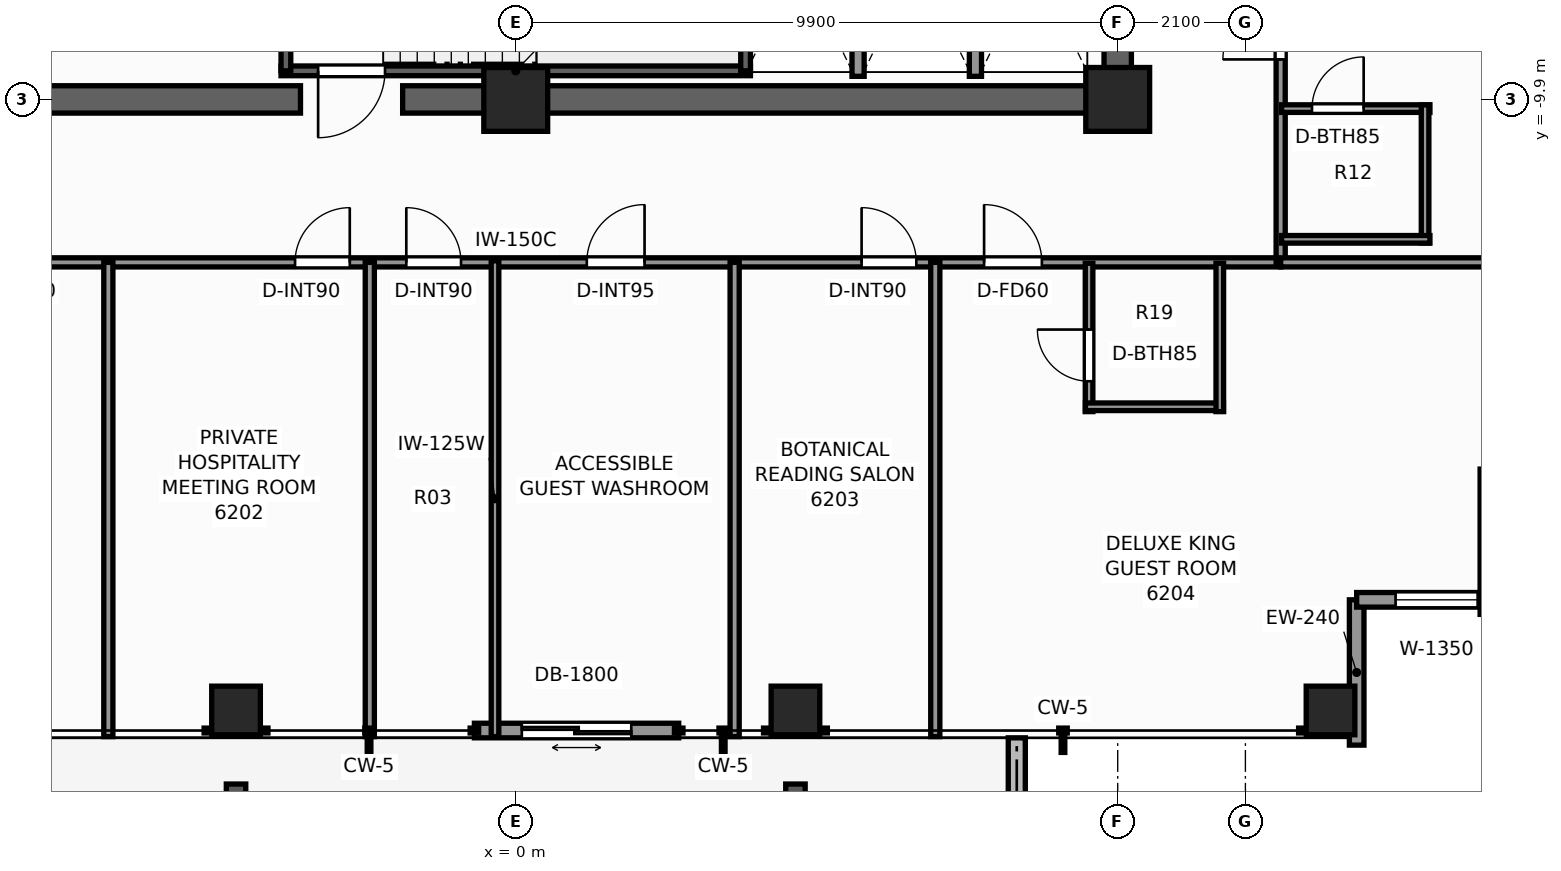
"""IFC4 building model, lengths in metres.
Left out: names, types, materials, properties, quantities, classifications, styles, units other than length and angle.
Written with IfcOpenShell. Run it as: python <this file> out.ifc"""

import sys

from ifc_helpers import new_model, si_unit, direction, frame, frame_2d, origin, origin_2d, place, context, subcontext, project, spatial, rectangle, extrude, element, fill, save


model = new_model("IFC4")
c1 = context("Model", 3, precision=1e-05, world=origin(), true_north=direction((0.0, 1.0)))
c2 = subcontext(c1, "Body", "Model", "MODEL_VIEW")
j1 = project(units=[si_unit("LENGTHUNIT", "METRE"), si_unit("PLANEANGLEUNIT", "RADIAN")], contexts=[c1])
p1 = place(None, origin())
s1 = spatial("IfcSite", under=j1, at=p1, CompositionType="ELEMENT")
p2 = place(p1, origin())
s2 = spatial("IfcBuilding", under=s1, at=p2, CompositionType="ELEMENT")
p3 = place(p2, frame((0.0, 0.0, 213.0)))
s3 = spatial("IfcBuildingStorey", under=s2, at=p3, CompositionType="ELEMENT", Elevation=213.0)
p4 = place(p3, frame((10.125, -9.9, 0.0), z_axis=(0.0, 0.0, 1.0), x_axis=(-1.0, 0.0, 0.0)))
e1 = element("IfcWall", 1, at=p4, inside=s3, PredefinedType="SHEAR", context=c2, shape_type="SweptSolid", body=[
    extrude(rectangle(XDim=11.985, YDim=0.45, at=frame_2d((5.993, 0.0))), origin(), (0.0, 0.0, 1.0), 3.3),
])
p5 = place(p3, frame((-3.54, -9.9, 0.0), z_axis=(0.0, 0.0, 1.0), x_axis=(-1.0, 0.0, 0.0)))
e2 = element("IfcWall", 2, at=p5, inside=s3, PredefinedType="SHEAR", context=c2, shape_type="SweptSolid", body=[
    extrude(rectangle(XDim=6.585, YDim=0.45, at=frame_2d((3.292, 0.0))), origin(), (0.0, 0.0, 1.0), 3.3),
])
p6 = place(p3, frame((9.9, -9.675, 0.0), z_axis=(0.0, 0.0, 1.0), x_axis=(0.0, 1.0, 0.0)))
e3 = element("IfcWall", 3, at=p6, inside=s3, PredefinedType="SHEAR", context=c2, shape_type="SweptSolid", body=[
    extrude(rectangle(XDim=4.125, YDim=0.45, at=frame_2d((2.062, 0.0))), origin(), (0.0, 0.0, 1.0), 3.3),
])
for number, where, z_axis, x_axis in (
    (4, (9.9, -9.9, 0.0), (0.0, 0.0, 1.0), (1.0, 0.0, 0.0)),
    (5, (0.0, -9.9, 0.0), (0.0, 0.0, 1.0), (1.0, 0.0, 0.0)),
):
    element("IfcColumn", number, at=place(p3, frame(where, z_axis=z_axis, x_axis=x_axis)), inside=s3, PredefinedType="COLUMN", context=c2, shape_type="SweptSolid", body=[
        extrude(rectangle(XDim=1.05, YDim=1.05, at=origin_2d()), origin(), (0.0, 0.0, 1.0), 3.3),
    ])
for number, where, z_axis, x_axis in (
    (6, (-4.6, -19.95, 0.0), (0.0, 0.0, 1.0), (1.0, 0.0, 0.0)),
    (7, (4.6, -19.95, 0.0), (0.0, 0.0, 1.0), (1.0, 0.0, 0.0)),
    (8, (13.4, -19.95, 0.0), (0.0, 0.0, 1.0), (1.0, 0.0, 0.0)),
):
    element("IfcColumn", number, at=place(p3, frame(where, z_axis=z_axis, x_axis=x_axis)), inside=s3, PredefinedType="COLUMN", context=c2, shape_type="SweptSolid", body=[
        extrude(rectangle(XDim=0.8, YDim=0.8, at=origin_2d()), origin(), (0.0, 0.0, 1.0), 3.3),
    ])
p7 = place(p3, frame((8.24, -23.074, -0.04), z_axis=(0.0, 0.0, 1.0), x_axis=(0.0, 1.0, 0.0)))
e9 = element("IfcWall", 9, at=p7, inside=s3, PredefinedType="PARAPET", context=c2, shape_type="SweptSolid", body=[
    extrude(rectangle(XDim=2.674, YDim=0.28, at=frame_2d((1.337, 0.0))), origin(), (0.0, 0.0, 1.0), 0.42),
])
p8 = place(p3, frame((2.68, -20.28, 0.0), z_axis=(0.0, 0.0, 1.0), x_axis=(-1.0, 0.0, 0.0)))
e10 = element("IfcWall", 10, at=p8, inside=s3, PredefinedType="STANDARD", context=c2, shape_type="SweptSolid", body=[
    extrude(rectangle(XDim=3.36, YDim=0.24, at=frame_2d((1.68, 0.0))), origin(), (0.0, 0.0, 1.0), 3.08),
])
p9 = place(p8, frame((0.78, 0.0, 0.0)))
e11 = element("IfcOpeningElement", 11, at=p9, cuts=e10, PredefinedType="OPENING", context=c2, shape_type="SweptSolid", body=[
    extrude(rectangle(XDim=1.8, YDim=2.2, at=frame_2d((0.9, 1.1))), frame((0.0, 0.13, 0.0), z_axis=(0.0, -1.0, 0.0), x_axis=(1.0, 0.0, 0.0)), (0.0, 0.0, 1.0), 0.26),
])
p10 = place(p3, frame((13.83, -18.13, 0.0), z_axis=(0.0, 0.0, 1.0), x_axis=(0.0, -1.0, 0.0)))
e12 = element("IfcWall", 12, at=p10, inside=s3, PredefinedType="STANDARD", context=c2, shape_type="SweptSolid", body=[
    extrude(rectangle(XDim=2.39, YDim=0.24, at=frame_2d((1.195, 0.0))), origin(), (0.0, 0.0, 1.0), 2.463),
])
p11 = place(p3, frame((16.22, -18.13, 0.0), z_axis=(0.0, 0.0, 1.0), x_axis=(-1.0, 0.0, 0.0)))
e13 = element("IfcWall", 13, at=p11, inside=s3, PredefinedType="STANDARD", context=c2, shape_type="SweptSolid", body=[
    extrude(rectangle(XDim=2.39, YDim=0.24, at=frame_2d((1.195, 0.0))), origin(), (0.0, 0.0, 1.0), 2.463),
])
p12 = place(p11, frame((0.4, 0.0, 0.65)))
e14 = element("IfcOpeningElement", 14, at=p12, cuts=e13, PredefinedType="OPENING", context=c2, shape_type="SweptSolid", body=[
    extrude(rectangle(XDim=1.35, YDim=1.55, at=frame_2d((0.675, 0.775))), frame((0.0, 0.13, 0.0), z_axis=(0.0, -1.0, 0.0), x_axis=(1.0, 0.0, 0.0)), (0.0, 0.0, 1.0), 0.26),
])
p13 = place(p3, frame((15.98, -15.98, 0.0), z_axis=(0.0, 0.0, 1.0), x_axis=(0.0, -1.0, 0.0)))
e15 = element("IfcWall", 15, at=p13, inside=s3, PredefinedType="STANDARD", context=c2, shape_type="SweptSolid", body=[
    extrude(rectangle(XDim=2.39, YDim=0.24, at=frame_2d((1.195, 0.0))), origin(), (0.0, 0.0, 1.0), 2.463),
])
p14 = place(p13, frame((0.525, 0.0, 0.65)))
e16 = element("IfcOpeningElement", 16, at=p14, cuts=e15, PredefinedType="OPENING", context=c2, shape_type="SweptSolid", body=[
    extrude(rectangle(XDim=1.1, YDim=1.45, at=frame_2d((0.55, 0.725))), frame((0.0, 0.13, 0.0), z_axis=(0.0, -1.0, 0.0), x_axis=(1.0, 0.0, 0.0)), (0.0, 0.0, 1.0), 0.26),
])
p15 = place(p3, frame((3.86, -9.43, 0.0), z_axis=(0.0, 0.0, 1.0), x_axis=(-1.0, 0.0, 0.0)))
e17 = element("IfcWall", 17, at=p15, inside=s3, PredefinedType="SHEAR", context=c2, shape_type="SweptSolid", body=[
    extrude(rectangle(XDim=7.72, YDim=0.16, at=frame_2d((3.86, 0.0))), origin(), (0.0, 0.0, 1.0), 3.3),
])
p16 = place(p15, frame((6.01, 0.0, 0.0)))
e18 = element("IfcOpeningElement", 18, at=p16, cuts=e17, PredefinedType="OPENING", context=c2, shape_type="SweptSolid", body=[
    extrude(rectangle(XDim=1.1, YDim=2.2, at=frame_2d((0.55, 1.1))), frame((0.0, 0.09, 0.0), z_axis=(0.0, -1.0, 0.0), x_axis=(1.0, 0.0, 0.0)), (0.0, 0.0, 1.0), 0.18),
])
for number, where, z_axis, x_axis in (
    (19, (-3.78, -9.43, 0.0), (0.0, 0.0, 1.0), (0.0, 1.0, 0.0)),
    (20, (3.78, -9.43, 0.0), (0.0, 0.0, 1.0), (0.0, 1.0, 0.0)),
):
    element("IfcWall", number, at=place(p3, frame(where, z_axis=z_axis, x_axis=x_axis)), inside=s3, PredefinedType="SHEAR", context=c2, shape_type="SweptSolid", body=[
        extrude(rectangle(XDim=3.35, YDim=0.16, at=frame_2d((1.675, 0.0))), origin(), (0.0, 0.0, 1.0), 3.3),
    ])
for number, where, z_axis, x_axis in (
    (21, (5.63, -9.52, 0.0), (0.0, 0.0, 1.0), (0.0, 1.0, 0.0)),
    (22, (7.56, -9.52, 0.0), (0.0, 0.0, 1.0), (0.0, 1.0, 0.0)),
):
    element("IfcWall", number, at=place(p3, frame(where, z_axis=z_axis, x_axis=x_axis)), inside=s3, PredefinedType="SOLIDWALL", context=c2, shape_type="SweptSolid", body=[
        extrude(rectangle(XDim=3.77, YDim=0.2, at=frame_2d((1.885, 0.0))), origin(), (0.0, 0.0, 1.0), 3.08),
    ])
p17 = place(p3, frame((-12.58, -12.58, 0.0), z_axis=(0.0, 0.0, 1.0), x_axis=(1.0, 0.0, 0.0)))
e23 = element("IfcWall", 23, at=p17, inside=s3, PredefinedType="PARTITIONING", context=c2, shape_type="SweptSolid", body=[
    extrude(rectangle(XDim=25.16, YDim=0.15, at=frame_2d((12.58, 0.0))), origin(), (0.0, 0.0, 1.0), 2.369),
])
p18 = place(p17, frame((3.919, 0.0, 0.0)))
e24 = element("IfcOpeningElement", 24, at=p18, cuts=e23, PredefinedType="OPENING", context=c2, shape_type="SweptSolid", body=[
    extrude(rectangle(XDim=0.9, YDim=2.06, at=frame_2d((0.45, 1.03))), frame((0.0, 0.085, 0.0), z_axis=(0.0, -1.0, 0.0), x_axis=(1.0, 0.0, 0.0)), (0.0, 0.0, 1.0), 0.17),
])
p19 = place(p17, frame((8.951, 0.0, 0.0)))
e25 = element("IfcOpeningElement", 25, at=p19, cuts=e23, PredefinedType="OPENING", context=c2, shape_type="SweptSolid", body=[
    extrude(rectangle(XDim=0.9, YDim=2.06, at=frame_2d((0.45, 1.03))), frame((0.0, 0.085, 0.0), z_axis=(0.0, -1.0, 0.0), x_axis=(1.0, 0.0, 0.0)), (0.0, 0.0, 1.0), 0.17),
])
p20 = place(p17, frame((10.78, 0.0, 0.0)))
e26 = element("IfcOpeningElement", 26, at=p20, cuts=e23, PredefinedType="OPENING", context=c2, shape_type="SweptSolid", body=[
    extrude(rectangle(XDim=0.9, YDim=2.06, at=frame_2d((0.45, 1.03))), frame((0.0, 0.085, 0.0), z_axis=(0.0, -1.0, 0.0), x_axis=(1.0, 0.0, 0.0)), (0.0, 0.0, 1.0), 0.17),
])
p21 = place(p17, frame((13.749, 0.0, 0.0)))
e27 = element("IfcOpeningElement", 27, at=p21, cuts=e23, PredefinedType="OPENING", context=c2, shape_type="SweptSolid", body=[
    extrude(rectangle(XDim=0.95, YDim=2.06, at=frame_2d((0.475, 1.03))), frame((0.0, 0.085, 0.0), z_axis=(0.0, -1.0, 0.0), x_axis=(1.0, 0.0, 0.0)), (0.0, 0.0, 1.0), 0.17),
])
p22 = place(p17, frame((18.268, 0.0, 0.0)))
e28 = element("IfcOpeningElement", 28, at=p22, cuts=e23, PredefinedType="OPENING", context=c2, shape_type="SweptSolid", body=[
    extrude(rectangle(XDim=0.9, YDim=2.06, at=frame_2d((0.45, 1.03))), frame((0.0, 0.085, 0.0), z_axis=(0.0, -1.0, 0.0), x_axis=(1.0, 0.0, 0.0)), (0.0, 0.0, 1.0), 0.17),
])
p23 = place(p17, frame((20.283, 0.0, 0.0)))
e29 = element("IfcOpeningElement", 29, at=p23, cuts=e23, PredefinedType="OPENING", context=c2, shape_type="SweptSolid", body=[
    extrude(rectangle(XDim=0.95, YDim=2.06, at=frame_2d((0.475, 1.03))), frame((0.0, 0.085, 0.0), z_axis=(0.0, -1.0, 0.0), x_axis=(1.0, 0.0, 0.0)), (0.0, 0.0, 1.0), 0.17),
])
p24 = place(p3, frame((12.58, -12.58, 0.0), z_axis=(0.0, 0.0, 1.0), x_axis=(0.0, 1.0, 0.0)))
e30 = element("IfcWall", 30, at=p24, inside=s3, PredefinedType="PARTITIONING", context=c2, shape_type="SweptSolid", body=[
    extrude(rectangle(XDim=24.84, YDim=0.15, at=frame_2d((12.42, 0.0))), origin(), (0.0, 0.0, 1.0), 2.369),
])
p25 = place(p24, frame((3.338, 0.0, 0.0)))
e31 = element("IfcOpeningElement", 31, at=p25, cuts=e30, PredefinedType="OPENING", context=c2, shape_type="SweptSolid", body=[
    extrude(rectangle(XDim=0.95, YDim=2.06, at=frame_2d((0.475, 1.03))), frame((0.0, 0.085, 0.0), z_axis=(0.0, -1.0, 0.0), x_axis=(1.0, 0.0, 0.0)), (0.0, 0.0, 1.0), 0.17),
])
p26 = place(p24, frame((9.119, 0.0, 0.0)))
e32 = element("IfcOpeningElement", 32, at=p26, cuts=e30, PredefinedType="OPENING", context=c2, shape_type="SweptSolid", body=[
    extrude(rectangle(XDim=0.95, YDim=2.06, at=frame_2d((0.475, 1.03))), frame((0.0, 0.085, 0.0), z_axis=(0.0, -1.0, 0.0), x_axis=(1.0, 0.0, 0.0)), (0.0, 0.0, 1.0), 0.17),
])
p27 = place(p24, frame((14.452, 0.0, 0.0)))
e33 = element("IfcOpeningElement", 33, at=p27, cuts=e30, PredefinedType="OPENING", context=c2, shape_type="SweptSolid", body=[
    extrude(rectangle(XDim=0.95, YDim=2.06, at=frame_2d((0.475, 1.03))), frame((0.0, 0.085, 0.0), z_axis=(0.0, -1.0, 0.0), x_axis=(1.0, 0.0, 0.0)), (0.0, 0.0, 1.0), 0.17),
])
p28 = place(p24, frame((20.887, 0.0, 0.0)))
e34 = element("IfcOpeningElement", 34, at=p28, cuts=e30, PredefinedType="OPENING", context=c2, shape_type="SweptSolid", body=[
    extrude(rectangle(XDim=0.95, YDim=2.06, at=frame_2d((0.475, 1.03))), frame((0.0, 0.085, 0.0), z_axis=(0.0, -1.0, 0.0), x_axis=(1.0, 0.0, 0.0)), (0.0, 0.0, 1.0), 0.17),
])
p29 = place(p3, frame((12.58, -12.58, 0.0), z_axis=(0.0, 0.0, 1.0), x_axis=(1.0, 0.0, 0.0)))
e35 = element("IfcWall", 35, at=p29, inside=s3, PredefinedType="PARTITIONING", context=c2, shape_type="SweptSolid", body=[
    extrude(rectangle(XDim=7.8, YDim=0.15, at=frame_2d((3.9, 0.0))), origin(), (0.0, 0.0, 1.0), 2.369),
])
for number, where, z_axis, x_axis in (
    (36, (-6.7, -20.38, 0.0), (0.0, 0.0, 1.0), (0.0, 1.0, 0.0)),
    (37, (-2.4, -20.38, 0.0), (0.0, 0.0, 1.0), (0.0, 1.0, 0.0)),
    (38, (3.6, -20.38, 0.0), (0.0, 0.0, 1.0), (0.0, 1.0, 0.0)),
):
    element("IfcWall", number, at=place(p3, frame(where, z_axis=z_axis, x_axis=x_axis)), inside=s3, PredefinedType="PARTITIONING", context=c2, shape_type="SweptSolid", body=[
        extrude(rectangle(XDim=7.8, YDim=0.15, at=frame_2d((3.9, 0.0))), origin(), (0.0, 0.0, 1.0), 2.453),
    ])
p30 = place(p3, frame((-0.341, -20.38, 0.0), z_axis=(0.0, 0.0, 1.0), x_axis=(0.0, 1.0, 0.0)))
e39 = element("IfcWall", 39, at=p30, inside=s3, PredefinedType="PARTITIONING", context=c2, shape_type="SweptSolid", body=[
    extrude(rectangle(XDim=7.825, YDim=0.125, at=frame_2d((3.913, 0.0))), origin(), (0.0, 0.0, 1.0), 2.453),
])
p31 = place(p3, frame((6.9, -20.38, 0.0), z_axis=(0.0, 0.0, 1.0), x_axis=(0.0, 1.0, 0.0)))
e40 = element("IfcWall", 40, at=p31, inside=s3, PredefinedType="PARTITIONING", context=c2, shape_type="SweptSolid", body=[
    extrude(rectangle(XDim=7.8, YDim=0.15, at=frame_2d((3.9, 0.0))), origin(), (0.0, 0.0, 1.0), 2.453),
])
p32 = place(p3, frame((9.429, -15.035, 0.0), z_axis=(0.0, 0.0, 1.0), x_axis=(0.0, 1.0, 0.0)))
e41 = element("IfcWall", 41, at=p32, inside=s3, PredefinedType="PARTITIONING", context=c2, shape_type="SweptSolid", body=[
    extrude(rectangle(XDim=2.44, YDim=0.125, at=frame_2d((1.22, 0.0))), origin(), (0.0, 0.0, 1.0), 3.08),
])
p33 = place(p32, frame((0.5, 0.0, 0.0)))
e42 = element("IfcOpeningElement", 42, at=p33, cuts=e41, PredefinedType="OPENING", context=c2, shape_type="SweptSolid", body=[
    extrude(rectangle(XDim=0.85, YDim=2.03, at=frame_2d((0.425, 1.015))), frame((0.0, 0.073, 0.0), z_axis=(0.0, -1.0, 0.0), x_axis=(1.0, 0.0, 0.0)), (0.0, 0.0, 1.0), 0.145),
])
p34 = place(p3, frame((9.369, -14.955, 0.0), z_axis=(0.0, 0.0, 1.0), x_axis=(1.0, 0.0, 0.0)))
e43 = element("IfcWall", 43, at=p34, inside=s3, PredefinedType="PARTITIONING", context=c2, shape_type="SweptSolid", body=[
    extrude(rectangle(XDim=2.27, YDim=0.125, at=frame_2d((1.135, 0.0))), origin(), (0.0, 0.0, 1.0), 2.369),
])
p35 = place(p3, frame((11.579, -15.035, 0.0), z_axis=(0.0, 0.0, 1.0), x_axis=(0.0, 1.0, 0.0)))
e44 = element("IfcWall", 44, at=p35, inside=s3, PredefinedType="PARTITIONING", context=c2, shape_type="SweptSolid", body=[
    extrude(rectangle(XDim=2.44, YDim=0.125, at=frame_2d((1.22, 0.0))), origin(), (0.0, 0.0, 1.0), 2.369),
])
p36 = place(p3, frame((12.595, -10.051, 0.0), z_axis=(0.0, 0.0, 1.0), x_axis=(1.0, 0.0, 0.0)))
e45 = element("IfcWall", 45, at=p36, inside=s3, PredefinedType="PARTITIONING", context=c2, shape_type="SweptSolid", body=[
    extrude(rectangle(XDim=2.44, YDim=0.125, at=frame_2d((1.22, 0.0))), origin(), (0.0, 0.0, 1.0), 3.08),
])
p37 = place(p36, frame((0.5, 0.0, 0.0)))
e46 = element("IfcOpeningElement", 46, at=p37, cuts=e45, PredefinedType="OPENING", context=c2, shape_type="SweptSolid", body=[
    extrude(rectangle(XDim=0.85, YDim=2.03, at=frame_2d((0.425, 1.015))), frame((0.0, 0.073, 0.0), z_axis=(0.0, -1.0, 0.0), x_axis=(1.0, 0.0, 0.0)), (0.0, 0.0, 1.0), 0.145),
])
p38 = place(p3, frame((14.955, -12.261, 0.0), z_axis=(0.0, 0.0, 1.0), x_axis=(0.0, 1.0, 0.0)))
e47 = element("IfcWall", 47, at=p38, inside=s3, PredefinedType="PARTITIONING", context=c2, shape_type="SweptSolid", body=[
    extrude(rectangle(XDim=2.27, YDim=0.125, at=frame_2d((1.135, 0.0))), origin(), (0.0, 0.0, 1.0), 2.369),
])
p39 = place(p3, frame((12.595, -12.201, 0.0), z_axis=(0.0, 0.0, 1.0), x_axis=(1.0, 0.0, 0.0)))
e48 = element("IfcWall", 48, at=p39, inside=s3, PredefinedType="PARTITIONING", context=c2, shape_type="SweptSolid", body=[
    extrude(rectangle(XDim=2.44, YDim=0.125, at=frame_2d((1.22, 0.0))), origin(), (0.0, 0.0, 1.0), 3.08),
])
p40 = place(p9, origin())
e49 = element("IfcDoor", 49, at=p40, inside=s3, OperationType="DOUBLE_DOOR_SLIDING", PredefinedType="DOOR", context=c2, shape_type="SweptSolid", body=[
    extrude(rectangle(XDim=1.8, YDim=2.2, at=frame_2d((0.9, 1.1))), frame((0.0, 0.025, 0.0), z_axis=(0.0, -1.0, 0.0), x_axis=(1.0, 0.0, 0.0)), (0.0, 0.0, 1.0), 0.05),
])
fill(e11, e49)
p41 = place(p12, origin())
e50 = element("IfcWindow", 50, at=p41, inside=s3, PartitioningType="SINGLE_PANEL", PredefinedType="WINDOW", context=c2, shape_type="SweptSolid", body=[
    extrude(rectangle(XDim=1.35, YDim=1.55, at=frame_2d((0.675, 0.775))), frame((0.0, 0.03, 0.0), z_axis=(0.0, -1.0, 0.0), x_axis=(1.0, 0.0, 0.0)), (0.0, 0.0, 1.0), 0.06),
])
fill(e14, e50)
p42 = place(p16, origin())
e51 = element("IfcDoor", 51, at=p42, inside=s3, OperationType="SINGLE_SWING_RIGHT", PredefinedType="DOOR", context=c2, shape_type="SweptSolid", body=[
    extrude(rectangle(XDim=1.1, YDim=2.2, at=frame_2d((0.55, 1.1))), frame((0.0, 0.025, 0.0), z_axis=(0.0, -1.0, 0.0), x_axis=(1.0, 0.0, 0.0)), (0.0, 0.0, 1.0), 0.05),
])
fill(e18, e51)
p43 = place(p19, origin())
e52 = element("IfcDoor", 52, at=p43, inside=s3, OperationType="SINGLE_SWING_RIGHT", PredefinedType="DOOR", context=c2, shape_type="SweptSolid", body=[
    extrude(rectangle(XDim=0.9, YDim=2.06, at=frame_2d((0.45, 1.03))), frame((0.0, 0.025, 0.0), z_axis=(0.0, -1.0, 0.0), x_axis=(1.0, 0.0, 0.0)), (0.0, 0.0, 1.0), 0.05),
])
fill(e25, e52)
p44 = place(p20, origin())
e53 = element("IfcDoor", 53, at=p44, inside=s3, OperationType="SINGLE_SWING_LEFT", PredefinedType="DOOR", context=c2, shape_type="SweptSolid", body=[
    extrude(rectangle(XDim=0.9, YDim=2.06, at=frame_2d((0.45, 1.03))), frame((0.0, 0.025, 0.0), z_axis=(0.0, -1.0, 0.0), x_axis=(1.0, 0.0, 0.0)), (0.0, 0.0, 1.0), 0.05),
])
fill(e26, e53)
p45 = place(p21, origin())
e54 = element("IfcDoor", 54, at=p45, inside=s3, OperationType="SINGLE_SWING_RIGHT", PredefinedType="DOOR", context=c2, shape_type="SweptSolid", body=[
    extrude(rectangle(XDim=0.95, YDim=2.06, at=frame_2d((0.475, 1.03))), frame((0.0, 0.025, 0.0), z_axis=(0.0, -1.0, 0.0), x_axis=(1.0, 0.0, 0.0)), (0.0, 0.0, 1.0), 0.05),
])
fill(e27, e54)
p46 = place(p22, origin())
e55 = element("IfcDoor", 55, at=p46, inside=s3, OperationType="SINGLE_SWING_LEFT", PredefinedType="DOOR", context=c2, shape_type="SweptSolid", body=[
    extrude(rectangle(XDim=0.9, YDim=2.06, at=frame_2d((0.45, 1.03))), frame((0.0, 0.025, 0.0), z_axis=(0.0, -1.0, 0.0), x_axis=(1.0, 0.0, 0.0)), (0.0, 0.0, 1.0), 0.05),
])
fill(e28, e55)
p47 = place(p33, origin())
e56 = element("IfcDoor", 56, at=p47, inside=s3, OperationType="SINGLE_SWING_RIGHT", PredefinedType="DOOR", context=c2, shape_type="SweptSolid", body=[
    extrude(rectangle(XDim=0.85, YDim=2.03, at=frame_2d((0.425, 1.015))), frame((0.0, 0.025, 0.0), z_axis=(0.0, -1.0, 0.0), x_axis=(1.0, 0.0, 0.0)), (0.0, 0.0, 1.0), 0.05),
])
fill(e42, e56)
p48 = place(p23, origin())
e57 = element("IfcDoor", 57, at=p48, inside=s3, OperationType="SINGLE_SWING_LEFT", PredefinedType="DOOR", context=c2, shape_type="SweptSolid", body=[
    extrude(rectangle(XDim=0.95, YDim=2.06, at=frame_2d((0.475, 1.03))), frame((0.0, 0.025, 0.0), z_axis=(0.0, -1.0, 0.0), x_axis=(1.0, 0.0, 0.0)), (0.0, 0.0, 1.0), 0.05),
])
fill(e29, e57)
p49 = place(p37, origin())
e58 = element("IfcDoor", 58, at=p49, inside=s3, OperationType="SINGLE_SWING_RIGHT", PredefinedType="DOOR", context=c2, shape_type="SweptSolid", body=[
    extrude(rectangle(XDim=0.85, YDim=2.03, at=frame_2d((0.425, 1.015))), frame((0.0, 0.025, 0.0), z_axis=(0.0, -1.0, 0.0), x_axis=(1.0, 0.0, 0.0)), (0.0, 0.0, 1.0), 0.05),
])
fill(e46, e58)
p50 = place(p25, origin())
e59 = element("IfcDoor", 59, at=p50, inside=s3, OperationType="SINGLE_SWING_LEFT", PredefinedType="DOOR", context=c2, shape_type="SweptSolid", body=[
    extrude(rectangle(XDim=0.95, YDim=2.06, at=frame_2d((0.475, 1.03))), frame((0.0, 0.025, 0.0), z_axis=(0.0, -1.0, 0.0), x_axis=(1.0, 0.0, 0.0)), (0.0, 0.0, 1.0), 0.05),
])
fill(e31, e59)
save(model, sys.argv[1])
